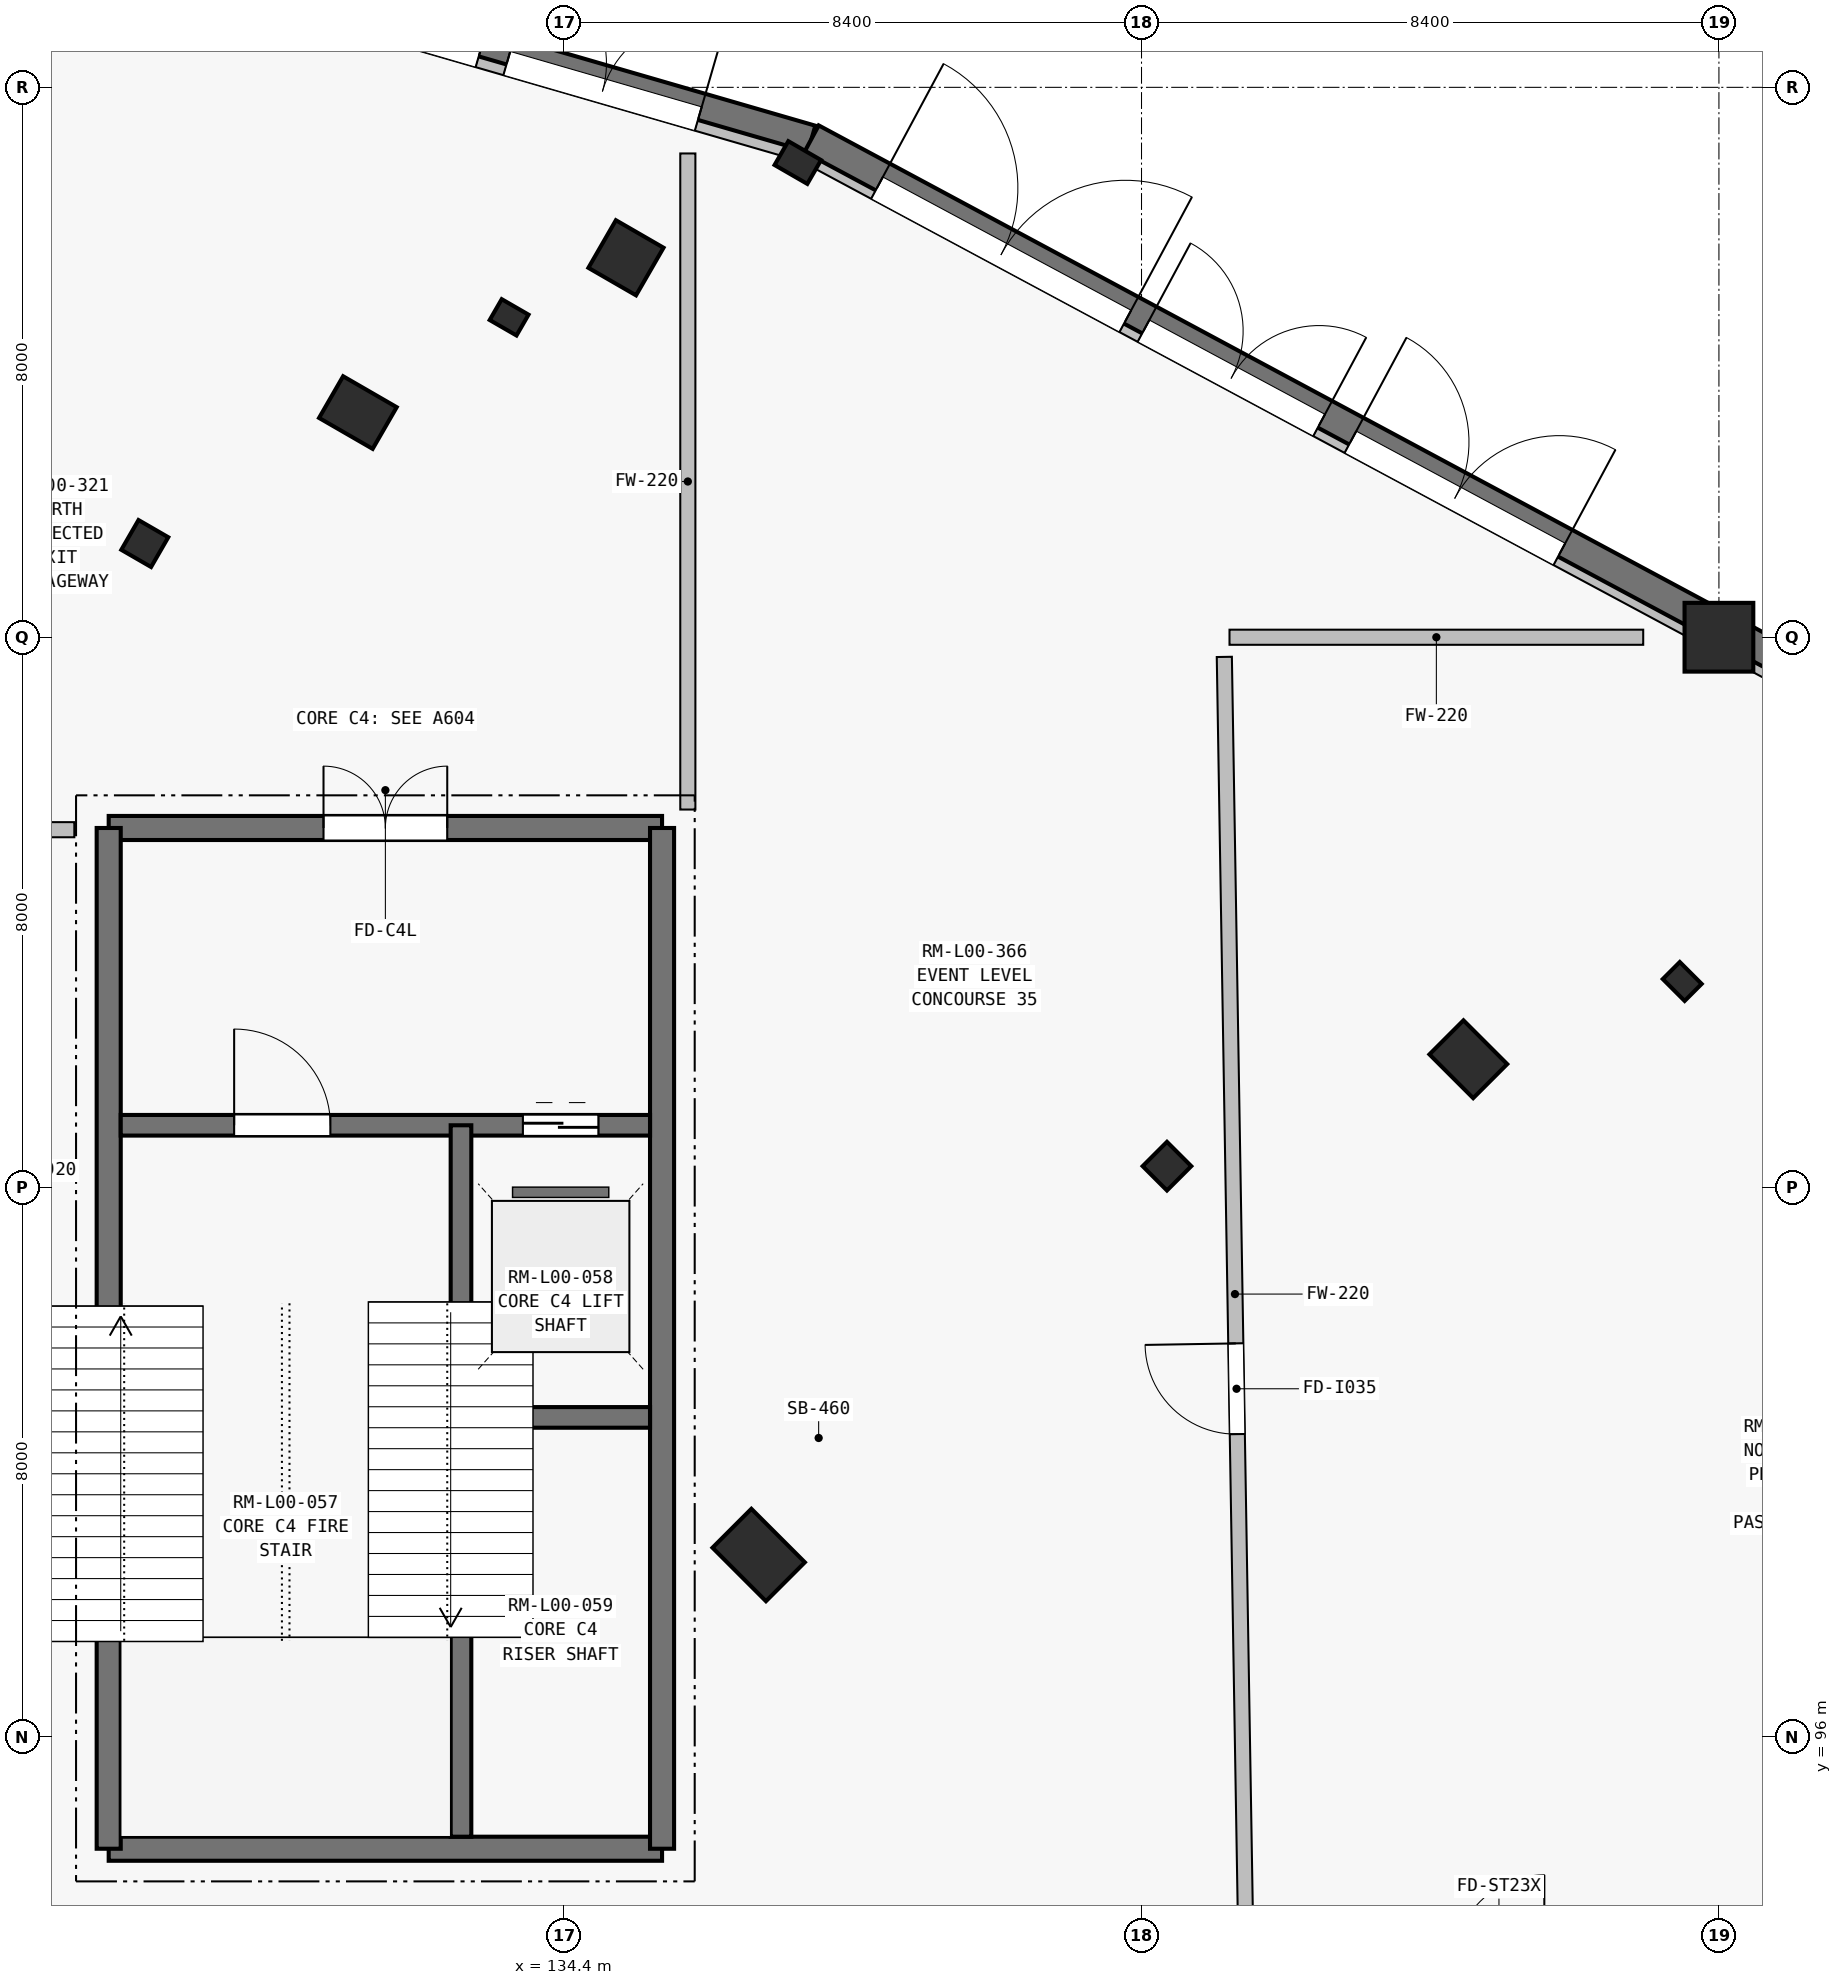
"""IFC4 building model, lengths in metres.
Left out: names, types, materials, properties, quantities, classifications, styles, units other than length and angle.
Written with IfcOpenShell. Run it as: python <this file> out.ifc"""

import sys

from ifc_helpers import new_model, si_unit, direction, frame, frame_2d, origin, origin_2d, place, context, subcontext, project, spatial, rectangle, i_section, extrude, element, fill, save


model = new_model("IFC4")
c1 = context("Model", 3, precision=1e-05, world=origin(), true_north=direction((0.0, 1.0)))
c2 = subcontext(c1, "Body", "Model", "MODEL_VIEW")
j1 = project(units=[si_unit("LENGTHUNIT", "METRE"), si_unit("PLANEANGLEUNIT", "RADIAN")], contexts=[c1])
p1 = place(None, origin())
s1 = spatial("IfcSite", under=j1, at=p1, CompositionType="ELEMENT")
p2 = place(p1, origin())
s2 = spatial("IfcBuilding", under=s1, at=p2, CompositionType="ELEMENT")
p3 = place(p2, origin())
s3 = spatial("IfcBuildingStorey", under=s2, at=p3, CompositionType="ELEMENT", Elevation=0.0)
p4 = place(p3, frame((137.231, 98.648, 0.0), z_axis=(0.0, 0.0, 1.0), x_axis=(0.707106781187, 0.707106781187, 0.0)))
e1 = element("IfcColumn", 1, at=p4, inside=s3, PredefinedType="COLUMN", context=c2, shape_type="SweptSolid", body=[
    extrude(rectangle(XDim=0.8, YDim=1.1, at=origin_2d()), origin(), (0.0, 0.0, 1.0), 5.4),
])
for number, where, z_axis, x_axis in (
    (2, (143.17, 104.305, 0.0), (0.0, 0.0, 1.0), (0.707, 0.707, 0.0)),
    (3, (128.3, 113.363, 0.0), (0.0, 0.0, 1.0), (0.5, 0.866, 0.0)),
):
    element("IfcColumn", number, at=place(p3, frame(where, z_axis=z_axis, x_axis=x_axis)), inside=s3, PredefinedType="COLUMN", context=c2, shape_type="SweptSolid", body=[
        extrude(i_section(OverallWidth=0.5, OverallDepth=0.5, WebThickness=0.02, FlangeThickness=0.035, at=origin_2d()), origin(), (0.0, 0.0, 1.0), 5.4),
    ])
for number, where, z_axis, x_axis in (
    (4, (147.554, 105.861, 0.0), (0.0, 0.0, 1.0), (0.707, 0.707, 0.0)),
    (5, (131.4, 115.269, 0.0), (0.0, 0.0, 1.0), (0.5, 0.866, 0.0)),
):
    element("IfcColumn", number, at=place(p3, frame(where, z_axis=z_axis, x_axis=x_axis)), inside=s3, PredefinedType="COLUMN", context=c2, shape_type="SweptSolid", body=[
        extrude(rectangle(XDim=0.7, YDim=0.9, at=origin_2d()), origin(), (0.0, 0.0, 1.0), 5.4),
    ])
p5 = place(p3, frame((135.3, 117.521, 0.0), z_axis=(0.0, 0.0, 1.0), x_axis=(0.5, 0.866025403784, 0.0)))
e6 = element("IfcColumn", 6, at=p5, inside=s3, PredefinedType="COLUMN", context=c2, shape_type="SweptSolid", body=[
    extrude(rectangle(XDim=0.8, YDim=0.8, at=origin_2d()), origin(), (0.0, 0.0, 1.0), 5.4),
])
p6 = place(p3, frame((151.2, 112.0, 0.0), z_axis=(0.0, 0.0, 1.0), x_axis=(1.0, 0.0, 0.0)))
e7 = element("IfcColumn", 7, at=p6, inside=s3, PredefinedType="COLUMN", context=c2, shape_type="SweptSolid", body=[
    extrude(rectangle(XDim=1.0, YDim=1.0, at=origin_2d()), origin(), (0.0, 0.0, 1.0), 5.15),
])
p7 = place(p3, frame((137.8, 118.906, 0.0), z_axis=(0.0, 0.0, 1.0), x_axis=(0.5, 0.866025403784, 0.0)))
e8 = element("IfcColumn", 8, at=p7, inside=s3, PredefinedType="PILASTER", context=c2, shape_type="SweptSolid", body=[
    extrude(rectangle(XDim=0.4, YDim=0.55, at=origin_2d()), origin(), (0.0, 0.0, 1.0), 6.35),
])
for number, where, z_axis, x_axis in (
    (9, (150.666, 106.992, 0.0), (0.0, 0.0, 1.0), (0.707, 0.707, 0.0)),
    (10, (133.6, 116.654, 0.0), (0.0, 0.0, 1.0), (0.5, 0.866, 0.0)),
):
    element("IfcColumn", number, at=place(p3, frame(where, z_axis=z_axis, x_axis=x_axis)), inside=s3, PredefinedType="PILASTER", context=c2, shape_type="SweptSolid", body=[
        extrude(rectangle(XDim=0.35, YDim=0.45, at=origin_2d()), origin(), (0.0, 0.0, 1.0), 5.4),
    ])
p8 = place(p3, frame((115.913, 125.465, 0.0), z_axis=(0.0, 0.0, 1.0), x_axis=(0.960489205427, -0.278317240319, 0.0)))
e11 = element("IfcWall", 11, at=p8, inside=s3, PredefinedType="SOLIDWALL", context=c2, shape_type="SweptSolid", body=[
    extrude(rectangle(XDim=22.987, YDim=0.36, at=frame_2d((11.494, 0.0))), origin(), (0.0, 0.0, 1.0), 5.15),
])
p9 = place(p8, frame((9.693, 0.0, 0.0)))
e12 = element("IfcOpeningElement", 12, at=p9, cuts=e11, PredefinedType="OPENING", context=c2, shape_type="SweptSolid", body=[
    extrude(rectangle(XDim=3.6, YDim=2.6, at=frame_2d((1.8, 1.3))), frame((0.0, 0.19, 0.0), z_axis=(0.0, -1.0, 0.0), x_axis=(1.0, 0.0, 0.0)), (0.0, 0.0, 1.0), 0.38),
])
p10 = place(p8, frame((1.22, 0.0, 0.0)))
e13 = element("IfcOpeningElement", 13, at=p10, cuts=e11, PredefinedType="OPENING", context=c2, shape_type="SweptSolid", body=[
    extrude(rectangle(XDim=4.3, YDim=2.75, at=frame_2d((2.15, 1.375))), frame((0.0, 0.19, 0.0), z_axis=(0.0, -1.0, 0.0), x_axis=(1.0, 0.0, 0.0)), (0.0, 0.0, 1.0), 0.38),
])
p11 = place(p8, frame((13.76, 0.0, 0.0)))
e14 = element("IfcOpeningElement", 14, at=p11, cuts=e11, PredefinedType="OPENING", context=c2, shape_type="SweptSolid", body=[
    extrude(rectangle(XDim=4.2, YDim=2.7, at=frame_2d((2.1, 1.35))), frame((0.0, 0.19, 0.0), z_axis=(0.0, -1.0, 0.0), x_axis=(1.0, 0.0, 0.0)), (0.0, 0.0, 1.0), 0.38),
])
p12 = place(p8, frame((5.84, 0.0, 0.0)))
e15 = element("IfcOpeningElement", 15, at=p12, cuts=e11, PredefinedType="OPENING", context=c2, shape_type="SweptSolid", body=[
    extrude(rectangle(XDim=2.9, YDim=2.55, at=frame_2d((1.45, 1.275))), frame((0.0, 0.19, 0.0), z_axis=(0.0, -1.0, 0.0), x_axis=(1.0, 0.0, 0.0)), (0.0, 0.0, 1.0), 0.38),
])
p13 = place(p8, frame((18.38, 0.0, 0.0)))
e16 = element("IfcOpeningElement", 16, at=p13, cuts=e11, PredefinedType="OPENING", context=c2, shape_type="SweptSolid", body=[
    extrude(rectangle(XDim=2.9, YDim=2.55, at=frame_2d((1.45, 1.275))), frame((0.0, 0.19, 0.0), z_axis=(0.0, -1.0, 0.0), x_axis=(1.0, 0.0, 0.0)), (0.0, 0.0, 1.0), 0.38),
])
p14 = place(p3, frame((137.877, 119.114, 0.0), z_axis=(0.0, 0.0, 1.0), x_axis=(0.881084068803, -0.47295968507, 0.0)))
e17 = element("IfcWall", 17, at=p14, inside=s3, PredefinedType="SOLIDWALL", context=c2, shape_type="SweptSolid", body=[
    extrude(rectangle(XDim=21.524, YDim=0.36, at=frame_2d((10.762, 0.0))), origin(), (0.0, 0.0, 1.0), 5.15),
])
p15 = place(p14, frame((16.31, 0.0, 0.0)))
e18 = element("IfcOpeningElement", 18, at=p15, cuts=e17, PredefinedType="OPENING", context=c2, shape_type="SweptSolid", body=[
    extrude(rectangle(XDim=2.9, YDim=2.55, at=frame_2d((1.45, 1.275))), frame((0.0, 0.19, 0.0), z_axis=(0.0, -1.0, 0.0), x_axis=(1.0, 0.0, 0.0)), (0.0, 0.0, 1.0), 0.38),
])
p16 = place(p14, frame((9.037, 0.0, 0.0)))
e19 = element("IfcOpeningElement", 19, at=p16, cuts=e17, PredefinedType="OPENING", context=c2, shape_type="SweptSolid", body=[
    extrude(rectangle(XDim=3.45, YDim=2.6, at=frame_2d((1.725, 1.3))), frame((0.0, 0.19, 0.0), z_axis=(0.0, -1.0, 0.0), x_axis=(1.0, 0.0, 0.0)), (0.0, 0.0, 1.0), 0.38),
])
p17 = place(p14, frame((1.22, 0.0, 0.0)))
e20 = element("IfcOpeningElement", 20, at=p17, cuts=e17, PredefinedType="OPENING", context=c2, shape_type="SweptSolid", body=[
    extrude(rectangle(XDim=4.1, YDim=2.7, at=frame_2d((2.05, 1.35))), frame((0.0, 0.19, 0.0), z_axis=(0.0, -1.0, 0.0), x_axis=(1.0, 0.0, 0.0)), (0.0, 0.0, 1.0), 0.38),
])
p18 = place(p14, frame((5.62, 0.0, 0.0)))
e21 = element("IfcOpeningElement", 21, at=p18, cuts=e17, PredefinedType="OPENING", context=c2, shape_type="SweptSolid", body=[
    extrude(rectangle(XDim=2.9, YDim=2.55, at=frame_2d((1.45, 1.275))), frame((0.0, 0.19, 0.0), z_axis=(0.0, -1.0, 0.0), x_axis=(1.0, 0.0, 0.0)), (0.0, 0.0, 1.0), 0.38),
])
p19 = place(p3, frame((116.004, 125.626, -4.5), z_axis=(0.0, 0.0, 1.0), x_axis=(0.960486896269, -0.278325209236, 0.0)))
e22 = element("IfcWall", 22, at=p19, inside=s3, PredefinedType="USERDEFINED", context=c2, shape_type="SweptSolid", body=[
    extrude(rectangle(XDim=22.9, YDim=0.395, at=frame_2d((11.45, 0.0))), origin(), (0.0, 0.0, 1.0), 4.5),
])
p20 = place(p3, frame((138.0, 119.252, -4.5), z_axis=(0.0, 0.0, 1.0), x_axis=(0.881081793717, -0.472963923339, 0.0)))
e23 = element("IfcWall", 23, at=p20, inside=s3, PredefinedType="USERDEFINED", context=c2, shape_type="SweptSolid", body=[
    extrude(rectangle(XDim=21.438, YDim=0.44, at=frame_2d((10.719, 0.0))), origin(), (0.0, 0.0, 1.0), 4.5),
])
p21 = place(p3, frame((127.775, 94.375, 0.0), z_axis=(0.0, 0.0, 1.0), x_axis=(1.0, 0.0, 0.0)))
e24 = element("IfcWall", 24, at=p21, inside=s3, PredefinedType="SHEAR", context=c2, shape_type="SweptSolid", body=[
    extrude(rectangle(XDim=8.05, YDim=0.35, at=frame_2d((4.025, 0.0))), origin(), (0.0, 0.0, 1.0), 5.4),
])
p22 = place(p3, frame((127.775, 109.225, 0.0), z_axis=(0.0, 0.0, 1.0), x_axis=(1.0, 0.0, 0.0)))
e25 = element("IfcWall", 25, at=p22, inside=s3, PredefinedType="SHEAR", context=c2, shape_type="SweptSolid", body=[
    extrude(rectangle(XDim=8.05, YDim=0.35, at=frame_2d((4.025, 0.0))), origin(), (0.0, 0.0, 1.0), 5.4),
])
p23 = place(p22, frame((3.125, 0.0, 0.0)))
e26 = element("IfcOpeningElement", 26, at=p23, cuts=e25, PredefinedType="OPENING", context=c2, shape_type="SweptSolid", body=[
    extrude(rectangle(XDim=1.8, YDim=2.25, at=frame_2d((0.9, 1.125))), frame((0.0, 0.185, 0.0), z_axis=(0.0, -1.0, 0.0), x_axis=(1.0, 0.0, 0.0)), (0.0, 0.0, 1.0), 0.37),
])
for number, where, z_axis, x_axis in (
    (27, (127.775, 94.375, 0.0), (0.0, 0.0, 1.0), (0.0, 1.0, 0.0)),
    (28, (135.825, 94.375, 0.0), (0.0, 0.0, 1.0), (0.0, 1.0, 0.0)),
):
    element("IfcWall", number, at=place(p3, frame(where, z_axis=z_axis, x_axis=x_axis)), inside=s3, PredefinedType="SHEAR", context=c2, shape_type="SweptSolid", body=[
        extrude(rectangle(XDim=14.85, YDim=0.35, at=frame_2d((7.425, 0.0))), origin(), (0.0, 0.0, 1.0), 5.4),
    ])
p24 = place(p3, frame((127.95, 104.9, 0.0), z_axis=(0.0, 0.0, 1.0), x_axis=(1.0, 0.0, 0.0)))
e29 = element("IfcWall", 29, at=p24, inside=s3, PredefinedType="SHEAR", context=c2, shape_type="SweptSolid", body=[
    extrude(rectangle(XDim=7.7, YDim=0.3, at=frame_2d((3.85, 0.0))), origin(), (0.0, 0.0, 1.0), 5.4),
])
p25 = place(p24, frame((1.65, 0.0, 0.0)))
e30 = element("IfcOpeningElement", 30, at=p25, cuts=e29, PredefinedType="OPENING", context=c2, shape_type="SweptSolid", body=[
    extrude(rectangle(XDim=1.4, YDim=2.2, at=frame_2d((0.7, 1.1))), frame((0.0, 0.16, 0.0), z_axis=(0.0, -1.0, 0.0), x_axis=(1.0, 0.0, 0.0)), (0.0, 0.0, 1.0), 0.32),
])
p26 = place(p24, frame((5.85, 0.0, 0.0)))
e31 = element("IfcOpeningElement", 31, at=p26, cuts=e29, PredefinedType="OPENING", context=c2, shape_type="SweptSolid", body=[
    extrude(rectangle(XDim=1.1, YDim=2.2, at=frame_2d((0.55, 1.1))), frame((0.0, 0.16, 0.0), z_axis=(0.0, -1.0, 0.0), x_axis=(1.0, 0.0, 0.0)), (0.0, 0.0, 1.0), 0.32),
])
p27 = place(p3, frame((132.9, 94.55, 0.0), z_axis=(0.0, 0.0, 1.0), x_axis=(0.0, 1.0, 0.0)))
e32 = element("IfcWall", 32, at=p27, inside=s3, PredefinedType="SHEAR", context=c2, shape_type="SweptSolid", body=[
    extrude(rectangle(XDim=10.35, YDim=0.3, at=frame_2d((5.175, 0.0))), origin(), (0.0, 0.0, 1.0), 5.4),
])
p28 = place(p3, frame((133.05, 100.65, 0.0), z_axis=(0.0, 0.0, 1.0), x_axis=(1.0, 0.0, 0.0)))
e33 = element("IfcWall", 33, at=p28, inside=s3, PredefinedType="SHEAR", context=c2, shape_type="SweptSolid", body=[
    extrude(rectangle(XDim=2.6, YDim=0.3, at=frame_2d((1.3, 0.0))), origin(), (0.0, 0.0, 1.0), 5.4),
])
p29 = place(p3, frame((136.2, 119.038, 0.0), z_axis=(0.0, 0.0, 1.0), x_axis=(0.0, -1.0, 0.0)))
e34 = element("IfcWall", 34, at=p29, inside=s3, PredefinedType="SOLIDWALL", context=c2, shape_type="SweptSolid", body=[
    extrude(rectangle(XDim=9.545, YDim=0.22, at=frame_2d((4.772, 0.0))), origin(), (0.0, 0.0, 1.0), 5.12),
])
p30 = place(p3, frame((127.275, 109.2, 0.0), z_axis=(0.0, 0.0, 1.0), x_axis=(-1.0, 0.0, 0.0)))
e35 = element("IfcWall", 35, at=p30, inside=s3, PredefinedType="SOLIDWALL", context=c2, shape_type="SweptSolid", body=[
    extrude(rectangle(XDim=2.7, YDim=0.22, at=frame_2d((1.35, 0.0))), origin(), (0.0, 0.0, 1.0), 4.483),
])
p31 = place(p3, frame((144.08, 112.0, 0.0), z_axis=(0.0, 0.0, 1.0), x_axis=(1.0, 0.0, 0.0)))
e36 = element("IfcWall", 36, at=p31, inside=s3, PredefinedType="SOLIDWALL", context=c2, shape_type="SweptSolid", body=[
    extrude(rectangle(XDim=6.019, YDim=0.22, at=frame_2d((3.009, 0.0))), origin(), (0.0, 0.0, 1.0), 5.12),
])
p32 = place(p3, frame((144.314, 93.175, 0.0), z_axis=(0.0, 0.0, 1.0), x_axis=(-0.016708668232, 0.999860400459, 0.0)))
e37 = element("IfcWall", 37, at=p32, inside=s3, PredefinedType="SOLIDWALL", context=c2, shape_type="SweptSolid", body=[
    extrude(rectangle(XDim=18.542, YDim=0.22, at=frame_2d((9.271, 0.0))), origin(), (0.0, 0.0, 1.0), 4.295),
])
p33 = place(p32, frame((7.233, 0.0, 0.0)))
e38 = element("IfcOpeningElement", 38, at=p33, cuts=e37, PredefinedType="OPENING", context=c2, shape_type="SweptSolid", body=[
    extrude(rectangle(XDim=1.32, YDim=2.2, at=frame_2d((0.66, 1.1))), frame((0.0, 0.12, 0.0), z_axis=(0.0, -1.0, 0.0), x_axis=(1.0, 0.0, 0.0)), (0.0, 0.0, 1.0), 0.24),
])
p34 = place(p16, origin())
e39 = element("IfcDoor", 39, at=p34, inside=s3, OperationType="DOUBLE_DOOR_SINGLE_SWING", PredefinedType="DOOR", context=c2, shape_type="SweptSolid", body=[
    extrude(rectangle(XDim=3.45, YDim=2.6, at=frame_2d((1.725, 1.3))), frame((0.0, 0.025, 0.0), z_axis=(0.0, -1.0, 0.0), x_axis=(1.0, 0.0, 0.0)), (0.0, 0.0, 1.0), 0.05),
])
fill(e19, e39)
p35 = place(p11, origin())
e40 = element("IfcDoor", 40, at=p35, inside=s3, OperationType="DOUBLE_DOOR_SINGLE_SWING", PredefinedType="DOOR", context=c2, shape_type="SweptSolid", body=[
    extrude(rectangle(XDim=4.2, YDim=2.7, at=frame_2d((2.1, 1.35))), frame((0.0, 0.025, 0.0), z_axis=(0.0, -1.0, 0.0), x_axis=(1.0, 0.0, 0.0)), (0.0, 0.0, 1.0), 0.05),
])
fill(e14, e40)
p36 = place(p17, origin())
e41 = element("IfcDoor", 41, at=p36, inside=s3, OperationType="DOUBLE_DOOR_SINGLE_SWING", PredefinedType="DOOR", context=c2, shape_type="SweptSolid", body=[
    extrude(rectangle(XDim=4.1, YDim=2.7, at=frame_2d((2.05, 1.35))), frame((0.0, 0.025, 0.0), z_axis=(0.0, -1.0, 0.0), x_axis=(1.0, 0.0, 0.0)), (0.0, 0.0, 1.0), 0.05),
])
fill(e20, e41)
p37 = place(p13, origin())
e42 = element("IfcDoor", 42, at=p37, inside=s3, OperationType="DOUBLE_DOOR_SINGLE_SWING", PredefinedType="DOOR", context=c2, shape_type="SweptSolid", body=[
    extrude(rectangle(XDim=2.9, YDim=2.55, at=frame_2d((1.45, 1.275))), frame((0.0, 0.025, 0.0), z_axis=(0.0, -1.0, 0.0), x_axis=(1.0, 0.0, 0.0)), (0.0, 0.0, 1.0), 0.05),
])
fill(e16, e42)
p38 = place(p18, origin())
e43 = element("IfcDoor", 43, at=p38, inside=s3, OperationType="DOUBLE_DOOR_SINGLE_SWING", PredefinedType="DOOR", context=c2, shape_type="SweptSolid", body=[
    extrude(rectangle(XDim=2.9, YDim=2.55, at=frame_2d((1.45, 1.275))), frame((0.0, 0.025, 0.0), z_axis=(0.0, -1.0, 0.0), x_axis=(1.0, 0.0, 0.0)), (0.0, 0.0, 1.0), 0.05),
])
fill(e21, e43)
p39 = place(p23, origin())
e44 = element("IfcDoor", 44, at=p39, inside=s3, OperationType="DOUBLE_DOOR_SINGLE_SWING", PredefinedType="DOOR", context=c2, shape_type="SweptSolid", body=[
    extrude(rectangle(XDim=1.8, YDim=2.25, at=frame_2d((0.9, 1.125))), frame((0.0, 0.025, 0.0), z_axis=(0.0, -1.0, 0.0), x_axis=(1.0, 0.0, 0.0)), (0.0, 0.0, 1.0), 0.05),
])
fill(e26, e44)
p40 = place(p25, origin())
e45 = element("IfcDoor", 45, at=p40, inside=s3, OperationType="SINGLE_SWING_LEFT", PredefinedType="DOOR", context=c2, shape_type="SweptSolid", body=[
    extrude(rectangle(XDim=1.4, YDim=2.2, at=frame_2d((0.7, 1.1))), frame((0.0, 0.025, 0.0), z_axis=(0.0, -1.0, 0.0), x_axis=(1.0, 0.0, 0.0)), (0.0, 0.0, 1.0), 0.05),
])
fill(e30, e45)
p41 = place(p26, origin())
e46 = element("IfcDoor", 46, at=p41, inside=s3, OperationType="SLIDING_TO_LEFT", PredefinedType="DOOR", context=c2, shape_type="SweptSolid", body=[
    extrude(rectangle(XDim=1.1, YDim=2.2, at=frame_2d((0.55, 1.1))), frame((0.0, 0.025, 0.0), z_axis=(0.0, -1.0, 0.0), x_axis=(1.0, 0.0, 0.0)), (0.0, 0.0, 1.0), 0.05),
])
fill(e31, e46)
p42 = place(p33, origin())
e47 = element("IfcDoor", 47, at=p42, inside=s3, OperationType="SINGLE_SWING_RIGHT", PredefinedType="DOOR", context=c2, shape_type="SweptSolid", body=[
    extrude(rectangle(XDim=1.32, YDim=2.2, at=frame_2d((0.66, 1.1))), frame((0.0, 0.025, 0.0), z_axis=(0.0, -1.0, 0.0), x_axis=(1.0, 0.0, 0.0)), (0.0, 0.0, 1.0), 0.05),
])
fill(e38, e47)
save(model, sys.argv[1])
